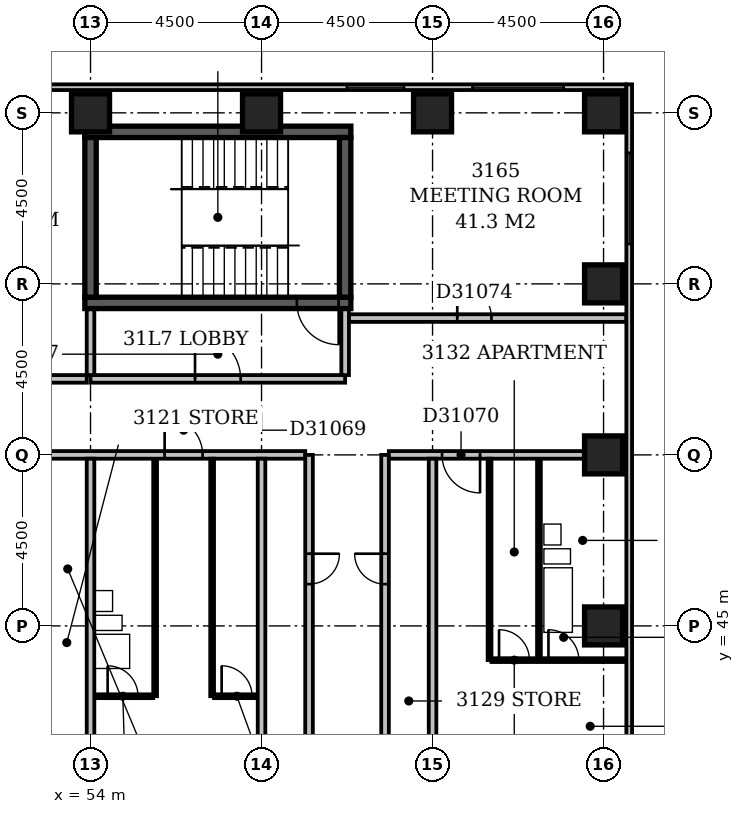
"""IFC4 building model, lengths in metres.
Left out: names, types, materials, properties, quantities, classifications, styles, units other than length and angle.
Written with IfcOpenShell. Run it as: python <this file> out.ifc"""

import sys

from ifc_helpers import new_model, si_unit, direction, frame, frame_2d, origin, origin_2d, place, context, subcontext, project, spatial, rectangle, extrude, element, fill, save


model = new_model("IFC4")
c1 = context("Model", 3, precision=1e-05, world=origin(), true_north=direction((0.0, 1.0)))
c2 = subcontext(c1, "Body", "Model", "MODEL_VIEW")
j1 = project(units=[si_unit("LENGTHUNIT", "METRE"), si_unit("PLANEANGLEUNIT", "RADIAN")], contexts=[c1])
p1 = place(None, origin())
s1 = spatial("IfcSite", under=j1, at=p1, CompositionType="ELEMENT")
p2 = place(p1, origin())
s2 = spatial("IfcBuilding", under=s1, at=p2, CompositionType="ELEMENT")
p3 = place(p2, frame((0.0, 0.0, 126.8)))
s3 = spatial("IfcBuildingStorey", under=s2, at=p3, CompositionType="ELEMENT", Elevation=126.8)
p4 = place(p3, frame((53.85, 53.5, -0.3), z_axis=(0.0, 0.0, 1.0), x_axis=(1.0, 0.0, 0.0)))
e1 = element("IfcWall", 1, at=p4, inside=s3, PredefinedType="SHEAR", context=c2, shape_type="SweptSolid", body=[
    extrude(rectangle(XDim=7.0, YDim=0.3, at=frame_2d((3.5, 0.0))), origin(), (0.0, 0.0, 1.0), 3.6),
])
p5 = place(p4, frame((5.58, 0.0, 0.3)))
e2 = element("IfcOpeningElement", 2, at=p5, cuts=e1, PredefinedType="OPENING", context=c2, shape_type="SweptSolid", body=[
    extrude(rectangle(XDim=1.1, YDim=2.1, at=frame_2d((0.55, 1.05))), frame((0.0, 0.162, 0.0), z_axis=(0.0, -1.0, 0.0), x_axis=(1.0, 0.0, 0.0)), (0.0, 0.0, 1.0), 0.324),
])
p6 = place(p3, frame((53.85, 58.0, -0.3), z_axis=(0.0, 0.0, 1.0), x_axis=(1.0, 0.0, 0.0)))
e3 = element("IfcWall", 3, at=p6, inside=s3, PredefinedType="SHEAR", context=c2, shape_type="SweptSolid", body=[
    extrude(rectangle(XDim=7.0, YDim=0.3, at=frame_2d((3.5, 0.0))), origin(), (0.0, 0.0, 1.0), 3.6),
])
for number, where, z_axis, x_axis in (
    (4, (54.0, 53.65, -0.3), (0.0, 0.0, 1.0), (0.0, 1.0, 0.0)),
    (5, (60.7, 53.65, -0.3), (0.0, 0.0, 1.0), (0.0, 1.0, 0.0)),
):
    element("IfcWall", number, at=place(p3, frame(where, z_axis=z_axis, x_axis=x_axis)), inside=s3, PredefinedType="SHEAR", context=c2, shape_type="SweptSolid", body=[
        extrude(rectangle(XDim=4.2, YDim=0.3, at=frame_2d((2.1, 0.0))), origin(), (0.0, 0.0, 1.0), 3.6),
    ])
for number, where, z_axis, x_axis in (
    (6, (67.5, 45.0, -0.3), (0.0, 0.0, 1.0), (1.0, 0.0, 0.0)),
    (7, (67.5, 49.5, -0.3), (0.0, 0.0, 1.0), (1.0, 0.0, 0.0)),
    (8, (67.5, 54.0, -0.3), (0.0, 0.0, 1.0), (1.0, 0.0, 0.0)),
    (9, (54.0, 58.5, -0.3), (0.0, 0.0, 1.0), (1.0, 0.0, 0.0)),
    (10, (58.5, 58.5, -0.3), (0.0, 0.0, 1.0), (1.0, 0.0, 0.0)),
    (11, (63.0, 58.5, -0.3), (0.0, 0.0, 1.0), (1.0, 0.0, 0.0)),
    (12, (67.5, 58.5, -0.3), (0.0, 0.0, 1.0), (1.0, 0.0, 0.0)),
):
    element("IfcColumn", number, at=place(p3, frame(where, z_axis=z_axis, x_axis=x_axis)), inside=s3, PredefinedType="COLUMN", context=c2, shape_type="SweptSolid", body=[
        extrude(rectangle(XDim=1.0, YDim=1.0, at=origin_2d()), origin(), (0.0, 0.0, 1.0), 3.6),
    ])
p7 = place(p3, frame((68.175, 35.4, 0.0), z_axis=(0.0, 0.0, 1.0), x_axis=(0.0, 1.0, 0.0)))
e13 = element("IfcWall", 13, at=p7, inside=s3, PredefinedType="STANDARD", context=c2, shape_type="SweptSolid", body=[
    extrude(rectangle(XDim=23.85, YDim=0.15, at=frame_2d((11.925, 0.0))), origin(), (0.0, 0.0, 1.0), 2.7),
])
p8 = place(p7, frame((1.65, 0.0, 0.6)))
e14 = element("IfcOpeningElement", 14, at=p8, cuts=e13, PredefinedType="OPENING", context=c2, shape_type="SweptSolid", body=[
    extrude(rectangle(XDim=2.4, YDim=1.8, at=frame_2d((1.2, 0.9))), frame((0.0, 0.087, 0.0), z_axis=(0.0, -1.0, 0.0), x_axis=(1.0, 0.0, 0.0)), (0.0, 0.0, 1.0), 0.174),
])
p9 = place(p7, frame((19.65, 0.0, 0.6)))
e15 = element("IfcOpeningElement", 15, at=p9, cuts=e13, PredefinedType="OPENING", context=c2, shape_type="SweptSolid", body=[
    extrude(rectangle(XDim=2.4, YDim=1.8, at=frame_2d((1.2, 0.9))), frame((0.0, 0.087, 0.0), z_axis=(0.0, -1.0, 0.0), x_axis=(1.0, 0.0, 0.0)), (0.0, 0.0, 1.0), 0.174),
])
p10 = place(p3, frame((68.1, 59.175, 0.0), z_axis=(0.0, 0.0, 1.0), x_axis=(-1.0, 0.0, 0.0)))
e16 = element("IfcWall", 16, at=p10, inside=s3, PredefinedType="STANDARD", context=c2, shape_type="SweptSolid", body=[
    extrude(rectangle(XDim=68.85, YDim=0.15, at=frame_2d((34.425, 0.0))), origin(), (0.0, 0.0, 1.0), 2.7),
])
p11 = place(p10, frame((1.65, 0.0, 0.6)))
e17 = element("IfcOpeningElement", 17, at=p11, cuts=e16, PredefinedType="OPENING", context=c2, shape_type="SweptSolid", body=[
    extrude(rectangle(XDim=2.4, YDim=1.8, at=frame_2d((1.2, 0.9))), frame((0.0, 0.087, 0.0), z_axis=(0.0, -1.0, 0.0), x_axis=(1.0, 0.0, 0.0)), (0.0, 0.0, 1.0), 0.174),
])
p12 = place(p10, frame((5.854, 0.0, 0.6)))
e18 = element("IfcOpeningElement", 18, at=p12, cuts=e16, PredefinedType="OPENING", context=c2, shape_type="SweptSolid", body=[
    extrude(rectangle(XDim=1.5, YDim=1.8, at=frame_2d((0.75, 0.9))), frame((0.0, 0.087, 0.0), z_axis=(0.0, -1.0, 0.0), x_axis=(1.0, 0.0, 0.0)), (0.0, 0.0, 1.0), 0.174),
])
p13 = place(p10, frame((15.15, 0.0, 0.6)))
e19 = element("IfcOpeningElement", 19, at=p13, cuts=e16, PredefinedType="OPENING", context=c2, shape_type="SweptSolid", body=[
    extrude(rectangle(XDim=2.4, YDim=1.8, at=frame_2d((1.2, 0.9))), frame((0.0, 0.087, 0.0), z_axis=(0.0, -1.0, 0.0), x_axis=(1.0, 0.0, 0.0)), (0.0, 0.0, 1.0), 0.174),
])
p14 = place(p10, frame((20.847, 0.0, 0.6)))
e20 = element("IfcOpeningElement", 20, at=p14, cuts=e16, PredefinedType="OPENING", context=c2, shape_type="SweptSolid", body=[
    extrude(rectangle(XDim=1.5, YDim=1.8, at=frame_2d((0.75, 0.9))), frame((0.0, 0.087, 0.0), z_axis=(0.0, -1.0, 0.0), x_axis=(1.0, 0.0, 0.0)), (0.0, 0.0, 1.0), 0.174),
])
p15 = place(p10, frame((37.65, 0.0, 0.6)))
e21 = element("IfcOpeningElement", 21, at=p15, cuts=e16, PredefinedType="OPENING", context=c2, shape_type="SweptSolid", body=[
    extrude(rectangle(XDim=2.4, YDim=1.8, at=frame_2d((1.2, 0.9))), frame((0.0, 0.087, 0.0), z_axis=(0.0, -1.0, 0.0), x_axis=(1.0, 0.0, 0.0)), (0.0, 0.0, 1.0), 0.174),
])
p16 = place(p3, frame((54.0, 51.5, 0.0), z_axis=(0.0, 0.0, 1.0), x_axis=(1.0, 0.0, 0.0)))
e22 = element("IfcWall", 22, at=p16, inside=s3, PredefinedType="PARTITIONING", context=c2, shape_type="SweptSolid", body=[
    extrude(rectangle(XDim=6.7, YDim=0.2, at=frame_2d((3.35, 0.0))), origin(), (0.0, 0.0, 1.0), 3.3),
])
p17 = place(p16, frame((2.75, 0.0, 0.0)))
e23 = element("IfcOpeningElement", 23, at=p17, cuts=e22, PredefinedType="OPENING", context=c2, shape_type="SweptSolid", body=[
    extrude(rectangle(XDim=1.2, YDim=2.1, at=frame_2d((0.6, 1.05))), frame((0.0, 0.112, 0.0), z_axis=(0.0, -1.0, 0.0), x_axis=(1.0, 0.0, 0.0)), (0.0, 0.0, 1.0), 0.224),
])
p18 = place(p3, frame((60.7, 51.6, 0.0), z_axis=(0.0, 0.0, 1.0), x_axis=(0.0, 1.0, 0.0)))
e24 = element("IfcWall", 24, at=p18, inside=s3, PredefinedType="PARTITIONING", context=c2, shape_type="SweptSolid", body=[
    extrude(rectangle(XDim=1.73, YDim=0.2, at=frame_2d((0.865, 0.0))), origin(), (0.0, 0.0, 1.0), 3.3),
])
p19 = place(p3, frame((54.0, 51.6, 0.0), z_axis=(0.0, 0.0, 1.0), x_axis=(0.0, 1.0, 0.0)))
e25 = element("IfcWall", 25, at=p19, inside=s3, PredefinedType="PARTITIONING", context=c2, shape_type="SweptSolid", body=[
    extrude(rectangle(XDim=1.73, YDim=0.2, at=frame_2d((0.865, 0.0))), origin(), (0.0, 0.0, 1.0), 2.6),
])
p20 = place(p3, frame((54.0, 36.5, 0.0), z_axis=(0.0, 0.0, 1.0), x_axis=(0.0, 1.0, 0.0)))
e26 = element("IfcWall", 26, at=p20, inside=s3, PredefinedType="PARTITIONING", context=c2, shape_type="SweptSolid", body=[
    extrude(rectangle(XDim=12.9, YDim=0.2, at=frame_2d((6.45, 0.0))), origin(), (0.0, 0.0, 1.0), 2.6),
])
p21 = place(p3, frame((58.5, 36.5, 0.0), z_axis=(0.0, 0.0, 1.0), x_axis=(0.0, 1.0, 0.0)))
e27 = element("IfcWall", 27, at=p21, inside=s3, PredefinedType="PARTITIONING", context=c2, shape_type="SweptSolid", body=[
    extrude(rectangle(XDim=12.9, YDim=0.2, at=frame_2d((6.45, 0.0))), origin(), (0.0, 0.0, 1.0), 3.3),
])
p22 = place(p3, frame((63.0, 36.5, 0.0), z_axis=(0.0, 0.0, 1.0), x_axis=(0.0, 1.0, 0.0)))
e28 = element("IfcWall", 28, at=p22, inside=s3, PredefinedType="PARTITIONING", context=c2, shape_type="SweptSolid", body=[
    extrude(rectangle(XDim=12.9, YDim=0.2, at=frame_2d((6.45, 0.0))), origin(), (0.0, 0.0, 1.0), 2.4),
])
p23 = place(p3, frame((59.75, 40.55, 0.0), z_axis=(0.0, 0.0, 1.0), x_axis=(0.0, 1.0, 0.0)))
e29 = element("IfcWall", 29, at=p23, inside=s3, PredefinedType="PARTITIONING", context=c2, shape_type="SweptSolid", body=[
    extrude(rectangle(XDim=8.95, YDim=0.2, at=frame_2d((4.475, 0.0))), origin(), (0.0, 0.0, 1.0), 3.3),
])
p24 = place(p23, frame((5.55, 0.0, 0.0)))
e30 = element("IfcOpeningElement", 30, at=p24, cuts=e29, PredefinedType="OPENING", context=c2, shape_type="SweptSolid", body=[
    extrude(rectangle(XDim=0.8, YDim=2.1, at=frame_2d((0.4, 1.05))), frame((0.0, 0.112, 0.0), z_axis=(0.0, -1.0, 0.0), x_axis=(1.0, 0.0, 0.0)), (0.0, 0.0, 1.0), 0.224),
])
p25 = place(p3, frame((61.75, 40.55, 0.0), z_axis=(0.0, 0.0, 1.0), x_axis=(0.0, 1.0, 0.0)))
e31 = element("IfcWall", 31, at=p25, inside=s3, PredefinedType="PARTITIONING", context=c2, shape_type="SweptSolid", body=[
    extrude(rectangle(XDim=8.95, YDim=0.2, at=frame_2d((4.475, 0.0))), origin(), (0.0, 0.0, 1.0), 3.3),
])
p26 = place(p25, frame((5.55, 0.0, 0.0)))
e32 = element("IfcOpeningElement", 32, at=p26, cuts=e31, PredefinedType="OPENING", context=c2, shape_type="SweptSolid", body=[
    extrude(rectangle(XDim=0.8, YDim=2.1, at=frame_2d((0.4, 1.05))), frame((0.0, 0.112, 0.0), z_axis=(0.0, -1.0, 0.0), x_axis=(1.0, 0.0, 0.0)), (0.0, 0.0, 1.0), 0.224),
])
p27 = place(p3, frame((54.1, 43.15, 0.0), z_axis=(0.0, 0.0, 1.0), x_axis=(1.0, 0.0, 0.0)))
e33 = element("IfcWall", 33, at=p27, inside=s3, PredefinedType="PARTITIONING", context=c2, shape_type="SweptSolid", body=[
    extrude(rectangle(XDim=1.55, YDim=0.1, at=frame_2d((0.775, 0.0))), origin(), (0.0, 0.0, 1.0), 3.3),
])
p28 = place(p27, frame((0.35, 0.0, 0.0)))
e34 = element("IfcOpeningElement", 34, at=p28, cuts=e33, PredefinedType="OPENING", context=c2, shape_type="SweptSolid", body=[
    extrude(rectangle(XDim=0.8, YDim=2.1, at=frame_2d((0.4, 1.05))), frame((0.0, 0.062, 0.0), z_axis=(0.0, -1.0, 0.0), x_axis=(1.0, 0.0, 0.0)), (0.0, 0.0, 1.0), 0.124),
])
p29 = place(p3, frame((55.7, 43.15, 0.0), z_axis=(0.0, 0.0, 1.0), x_axis=(0.0, 1.0, 0.0)))
e35 = element("IfcWall", 35, at=p29, inside=s3, PredefinedType="PLUMBINGWALL", context=c2, shape_type="SweptSolid", body=[
    extrude(rectangle(XDim=6.25, YDim=0.1, at=frame_2d((3.125, 0.0))), origin(), (0.0, 0.0, 1.0), 3.3),
])
p30 = place(p3, frame((57.2, 43.15, 0.0), z_axis=(0.0, 0.0, 1.0), x_axis=(0.0, 1.0, 0.0)))
e36 = element("IfcWall", 36, at=p30, inside=s3, PredefinedType="PARTITIONING", context=c2, shape_type="SweptSolid", body=[
    extrude(rectangle(XDim=6.25, YDim=0.1, at=frame_2d((3.125, 0.0))), origin(), (0.0, 0.0, 1.0), 3.3),
])
p31 = place(p3, frame((57.25, 43.15, 0.0), z_axis=(0.0, 0.0, 1.0), x_axis=(1.0, 0.0, 0.0)))
e37 = element("IfcWall", 37, at=p31, inside=s3, PredefinedType="PARTITIONING", context=c2, shape_type="SweptSolid", body=[
    extrude(rectangle(XDim=1.15, YDim=0.1, at=frame_2d((0.575, 0.0))), origin(), (0.0, 0.0, 1.0), 3.3),
])
p32 = place(p31, frame((0.2, 0.0, 0.0)))
e38 = element("IfcOpeningElement", 38, at=p32, cuts=e37, PredefinedType="OPENING", context=c2, shape_type="SweptSolid", body=[
    extrude(rectangle(XDim=0.8, YDim=2.1, at=frame_2d((0.4, 1.05))), frame((0.0, 0.062, 0.0), z_axis=(0.0, -1.0, 0.0), x_axis=(1.0, 0.0, 0.0)), (0.0, 0.0, 1.0), 0.124),
])
p33 = place(p3, frame((64.5, 44.1, 0.0), z_axis=(0.0, 0.0, 1.0), x_axis=(0.0, 1.0, 0.0)))
e39 = element("IfcWall", 39, at=p33, inside=s3, PredefinedType="PARTITIONING", context=c2, shape_type="SweptSolid", body=[
    extrude(rectangle(XDim=5.3, YDim=0.1, at=frame_2d((2.65, 0.0))), origin(), (0.0, 0.0, 1.0), 3.3),
])
p34 = place(p3, frame((64.55, 44.1, 0.0), z_axis=(0.0, 0.0, 1.0), x_axis=(1.0, 0.0, 0.0)))
e40 = element("IfcWall", 40, at=p34, inside=s3, PredefinedType="PARTITIONING", context=c2, shape_type="SweptSolid", body=[
    extrude(rectangle(XDim=3.55, YDim=0.1, at=frame_2d((1.775, 0.0))), origin(), (0.0, 0.0, 1.0), 3.3),
])
p35 = place(p34, frame((1.5, 0.0, 0.0)))
e41 = element("IfcOpeningElement", 41, at=p35, cuts=e40, PredefinedType="OPENING", context=c2, shape_type="SweptSolid", body=[
    extrude(rectangle(XDim=0.8, YDim=2.1, at=frame_2d((0.4, 1.05))), frame((0.0, 0.062, 0.0), z_axis=(0.0, -1.0, 0.0), x_axis=(1.0, 0.0, 0.0)), (0.0, 0.0, 1.0), 0.124),
])
p36 = place(p34, frame((0.2, 0.0, 0.0)))
e42 = element("IfcOpeningElement", 42, at=p36, cuts=e40, PredefinedType="OPENING", context=c2, shape_type="SweptSolid", body=[
    extrude(rectangle(XDim=0.8, YDim=2.1, at=frame_2d((0.4, 1.05))), frame((0.0, 0.062, 0.0), z_axis=(0.0, -1.0, 0.0), x_axis=(1.0, 0.0, 0.0)), (0.0, 0.0, 1.0), 0.124),
])
p37 = place(p3, frame((65.8, 44.15, 0.0), z_axis=(0.0, 0.0, 1.0), x_axis=(0.0, 1.0, 0.0)))
e43 = element("IfcWall", 43, at=p37, inside=s3, PredefinedType="PLUMBINGWALL", context=c2, shape_type="SweptSolid", body=[
    extrude(rectangle(XDim=5.25, YDim=0.1, at=frame_2d((2.625, 0.0))), origin(), (0.0, 0.0, 1.0), 3.3),
])
p38 = place(p3, frame((52.85, 49.5, 0.0), z_axis=(0.0, 0.0, 1.0), x_axis=(1.0, 0.0, 0.0)))
e44 = element("IfcWall", 44, at=p38, inside=s3, PredefinedType="PARTITIONING", context=c2, shape_type="SweptSolid", body=[
    extrude(rectangle(XDim=6.8, YDim=0.2, at=frame_2d((3.4, 0.0))), origin(), (0.0, 0.0, 1.0), 3.3),
])
p39 = place(p38, frame((3.1, 0.0, 0.0)))
e45 = element("IfcOpeningElement", 45, at=p39, cuts=e44, PredefinedType="OPENING", context=c2, shape_type="SweptSolid", body=[
    extrude(rectangle(XDim=1.0, YDim=2.1, at=frame_2d((0.5, 1.05))), frame((0.0, 0.112, 0.0), z_axis=(0.0, -1.0, 0.0), x_axis=(1.0, 0.0, 0.0)), (0.0, 0.0, 1.0), 0.224),
])
p40 = place(p3, frame((61.85, 49.5, 0.0), z_axis=(0.0, 0.0, 1.0), x_axis=(1.0, 0.0, 0.0)))
e46 = element("IfcWall", 46, at=p40, inside=s3, PredefinedType="PARTITIONING", context=c2, shape_type="SweptSolid", body=[
    extrude(rectangle(XDim=5.15, YDim=0.2, at=frame_2d((2.575, 0.0))), origin(), (0.0, 0.0, 1.0), 3.3),
])
p41 = place(p40, frame((1.4, 0.0, 0.0)))
e47 = element("IfcOpeningElement", 47, at=p41, cuts=e46, PredefinedType="OPENING", context=c2, shape_type="SweptSolid", body=[
    extrude(rectangle(XDim=1.0, YDim=2.1, at=frame_2d((0.5, 1.05))), frame((0.0, 0.112, 0.0), z_axis=(0.0, -1.0, 0.0), x_axis=(1.0, 0.0, 0.0)), (0.0, 0.0, 1.0), 0.224),
])
p42 = place(p3, frame((44.1, 51.5, 0.0), z_axis=(0.0, 0.0, 1.0), x_axis=(1.0, 0.0, 0.0)))
e48 = element("IfcWall", 48, at=p42, inside=s3, PredefinedType="PARTITIONING", context=c2, shape_type="SweptSolid", body=[
    extrude(rectangle(XDim=9.8, YDim=0.2, at=frame_2d((4.9, 0.0))), origin(), (0.0, 0.0, 1.0), 3.3),
])
p43 = place(p42, frame((4.45, 0.0, 0.0)))
e49 = element("IfcOpeningElement", 49, at=p43, cuts=e48, PredefinedType="OPENING", context=c2, shape_type="SweptSolid", body=[
    extrude(rectangle(XDim=0.9, YDim=2.1, at=frame_2d((0.45, 1.05))), frame((0.0, 0.112, 0.0), z_axis=(0.0, -1.0, 0.0), x_axis=(1.0, 0.0, 0.0)), (0.0, 0.0, 1.0), 0.224),
])
p44 = place(p3, frame((60.8, 53.1, 0.0), z_axis=(0.0, 0.0, 1.0), x_axis=(1.0, 0.0, 0.0)))
e50 = element("IfcWall", 50, at=p44, inside=s3, PredefinedType="PARTITIONING", context=c2, shape_type="SweptSolid", body=[
    extrude(rectangle(XDim=7.3, YDim=0.2, at=frame_2d((3.65, 0.0))), origin(), (0.0, 0.0, 1.0), 3.3),
])
p45 = place(p44, frame((2.85, 0.0, 0.0)))
e51 = element("IfcOpeningElement", 51, at=p45, cuts=e50, PredefinedType="OPENING", context=c2, shape_type="SweptSolid", body=[
    extrude(rectangle(XDim=0.9, YDim=2.1, at=frame_2d((0.45, 1.05))), frame((0.0, 0.112, 0.0), z_axis=(0.0, -1.0, 0.0), x_axis=(1.0, 0.0, 0.0)), (0.0, 0.0, 1.0), 0.224),
])
p46 = place(p9, origin())
e52 = element("IfcWindow", 52, at=p46, inside=s3, PartitioningType="SINGLE_PANEL", PredefinedType="WINDOW", context=c2, shape_type="SweptSolid", body=[
    extrude(rectangle(XDim=2.4, YDim=1.8, at=frame_2d((1.2, 0.9))), frame((0.0, 0.03, 0.0), z_axis=(0.0, -1.0, 0.0), x_axis=(1.0, 0.0, 0.0)), (0.0, 0.0, 1.0), 0.06),
])
fill(e15, e52)
p47 = place(p11, origin())
e53 = element("IfcWindow", 53, at=p47, inside=s3, PartitioningType="SINGLE_PANEL", PredefinedType="WINDOW", context=c2, shape_type="SweptSolid", body=[
    extrude(rectangle(XDim=2.4, YDim=1.8, at=frame_2d((1.2, 0.9))), frame((0.0, 0.03, 0.0), z_axis=(0.0, -1.0, 0.0), x_axis=(1.0, 0.0, 0.0)), (0.0, 0.0, 1.0), 0.06),
])
fill(e17, e53)
p48 = place(p12, origin())
e54 = element("IfcWindow", 54, at=p48, inside=s3, PartitioningType="SINGLE_PANEL", PredefinedType="WINDOW", context=c2, shape_type="SweptSolid", body=[
    extrude(rectangle(XDim=1.5, YDim=1.8, at=frame_2d((0.75, 0.9))), frame((0.0, 0.03, 0.0), z_axis=(0.0, -1.0, 0.0), x_axis=(1.0, 0.0, 0.0)), (0.0, 0.0, 1.0), 0.06),
])
fill(e18, e54)
p49 = place(p17, origin())
e55 = element("IfcDoor", 55, at=p49, inside=s3, OperationType="SINGLE_SWING_LEFT", PredefinedType="DOOR", context=c2, shape_type="SweptSolid", body=[
    extrude(rectangle(XDim=1.2, YDim=2.1, at=frame_2d((0.6, 1.05))), frame((0.0, 0.025, 0.0), z_axis=(0.0, -1.0, 0.0), x_axis=(1.0, 0.0, 0.0)), (0.0, 0.0, 1.0), 0.05),
])
fill(e23, e55)
p50 = place(p5, origin())
e56 = element("IfcDoor", 56, at=p50, inside=s3, OperationType="SINGLE_SWING_RIGHT", PredefinedType="DOOR", context=c2, shape_type="SweptSolid", body=[
    extrude(rectangle(XDim=1.1, YDim=2.1, at=frame_2d((0.55, 1.05))), frame((0.0, 0.025, 0.0), z_axis=(0.0, -1.0, 0.0), x_axis=(1.0, 0.0, 0.0)), (0.0, 0.0, 1.0), 0.05),
])
fill(e2, e56)
p51 = place(p24, origin())
e57 = element("IfcDoor", 57, at=p51, inside=s3, OperationType="SINGLE_SWING_RIGHT", PredefinedType="DOOR", context=c2, shape_type="SweptSolid", body=[
    extrude(rectangle(XDim=0.8, YDim=2.1, at=frame_2d((0.4, 1.05))), frame((0.0, 0.025, 0.0), z_axis=(0.0, -1.0, 0.0), x_axis=(1.0, 0.0, 0.0)), (0.0, 0.0, 1.0), 0.05),
])
fill(e30, e57)
p52 = place(p26, frame((0.8, 0.0, 0.0), z_axis=(0.0, 0.0, 1.0), x_axis=(-1.0, 0.0, 0.0)))
e58 = element("IfcDoor", 58, at=p52, inside=s3, OperationType="SINGLE_SWING_LEFT", PredefinedType="DOOR", context=c2, shape_type="SweptSolid", body=[
    extrude(rectangle(XDim=0.8, YDim=2.1, at=frame_2d((0.4, 1.05))), frame((0.0, 0.025, 0.0), z_axis=(0.0, -1.0, 0.0), x_axis=(1.0, 0.0, 0.0)), (0.0, 0.0, 1.0), 0.05),
])
fill(e32, e58)
p53 = place(p28, origin())
e59 = element("IfcDoor", 59, at=p53, inside=s3, OperationType="SINGLE_SWING_LEFT", PredefinedType="DOOR", context=c2, shape_type="SweptSolid", body=[
    extrude(rectangle(XDim=0.8, YDim=2.1, at=frame_2d((0.4, 1.05))), frame((0.0, 0.025, 0.0), z_axis=(0.0, -1.0, 0.0), x_axis=(1.0, 0.0, 0.0)), (0.0, 0.0, 1.0), 0.05),
])
fill(e34, e59)
p54 = place(p32, origin())
e60 = element("IfcDoor", 60, at=p54, inside=s3, OperationType="SINGLE_SWING_LEFT", PredefinedType="DOOR", context=c2, shape_type="SweptSolid", body=[
    extrude(rectangle(XDim=0.8, YDim=2.1, at=frame_2d((0.4, 1.05))), frame((0.0, 0.025, 0.0), z_axis=(0.0, -1.0, 0.0), x_axis=(1.0, 0.0, 0.0)), (0.0, 0.0, 1.0), 0.05),
])
fill(e38, e60)
p55 = place(p35, origin())
e61 = element("IfcDoor", 61, at=p55, inside=s3, OperationType="SINGLE_SWING_LEFT", PredefinedType="DOOR", context=c2, shape_type="SweptSolid", body=[
    extrude(rectangle(XDim=0.8, YDim=2.1, at=frame_2d((0.4, 1.05))), frame((0.0, 0.025, 0.0), z_axis=(0.0, -1.0, 0.0), x_axis=(1.0, 0.0, 0.0)), (0.0, 0.0, 1.0), 0.05),
])
fill(e41, e61)
p56 = place(p36, origin())
e62 = element("IfcDoor", 62, at=p56, inside=s3, OperationType="SINGLE_SWING_LEFT", PredefinedType="DOOR", context=c2, shape_type="SweptSolid", body=[
    extrude(rectangle(XDim=0.8, YDim=2.1, at=frame_2d((0.4, 1.05))), frame((0.0, 0.025, 0.0), z_axis=(0.0, -1.0, 0.0), x_axis=(1.0, 0.0, 0.0)), (0.0, 0.0, 1.0), 0.05),
])
fill(e42, e62)
p57 = place(p39, origin())
e63 = element("IfcDoor", 63, at=p57, inside=s3, OperationType="SINGLE_SWING_LEFT", PredefinedType="DOOR", context=c2, shape_type="SweptSolid", body=[
    extrude(rectangle(XDim=1.0, YDim=2.1, at=frame_2d((0.5, 1.05))), frame((0.0, 0.025, 0.0), z_axis=(0.0, -1.0, 0.0), x_axis=(1.0, 0.0, 0.0)), (0.0, 0.0, 1.0), 0.05),
])
fill(e45, e63)
p58 = place(p41, origin())
e64 = element("IfcDoor", 64, at=p58, inside=s3, OperationType="SINGLE_SWING_RIGHT", PredefinedType="DOOR", context=c2, shape_type="SweptSolid", body=[
    extrude(rectangle(XDim=1.0, YDim=2.1, at=frame_2d((0.5, 1.05))), frame((0.0, 0.025, 0.0), z_axis=(0.0, -1.0, 0.0), x_axis=(1.0, 0.0, 0.0)), (0.0, 0.0, 1.0), 0.05),
])
fill(e47, e64)
p59 = place(p45, origin())
e65 = element("IfcDoor", 65, at=p59, inside=s3, OperationType="SINGLE_SWING_LEFT", PredefinedType="DOOR", context=c2, shape_type="SweptSolid", body=[
    extrude(rectangle(XDim=0.9, YDim=2.1, at=frame_2d((0.45, 1.05))), frame((0.0, 0.025, 0.0), z_axis=(0.0, -1.0, 0.0), x_axis=(1.0, 0.0, 0.0)), (0.0, 0.0, 1.0), 0.05),
])
fill(e51, e65)
save(model, sys.argv[1])
